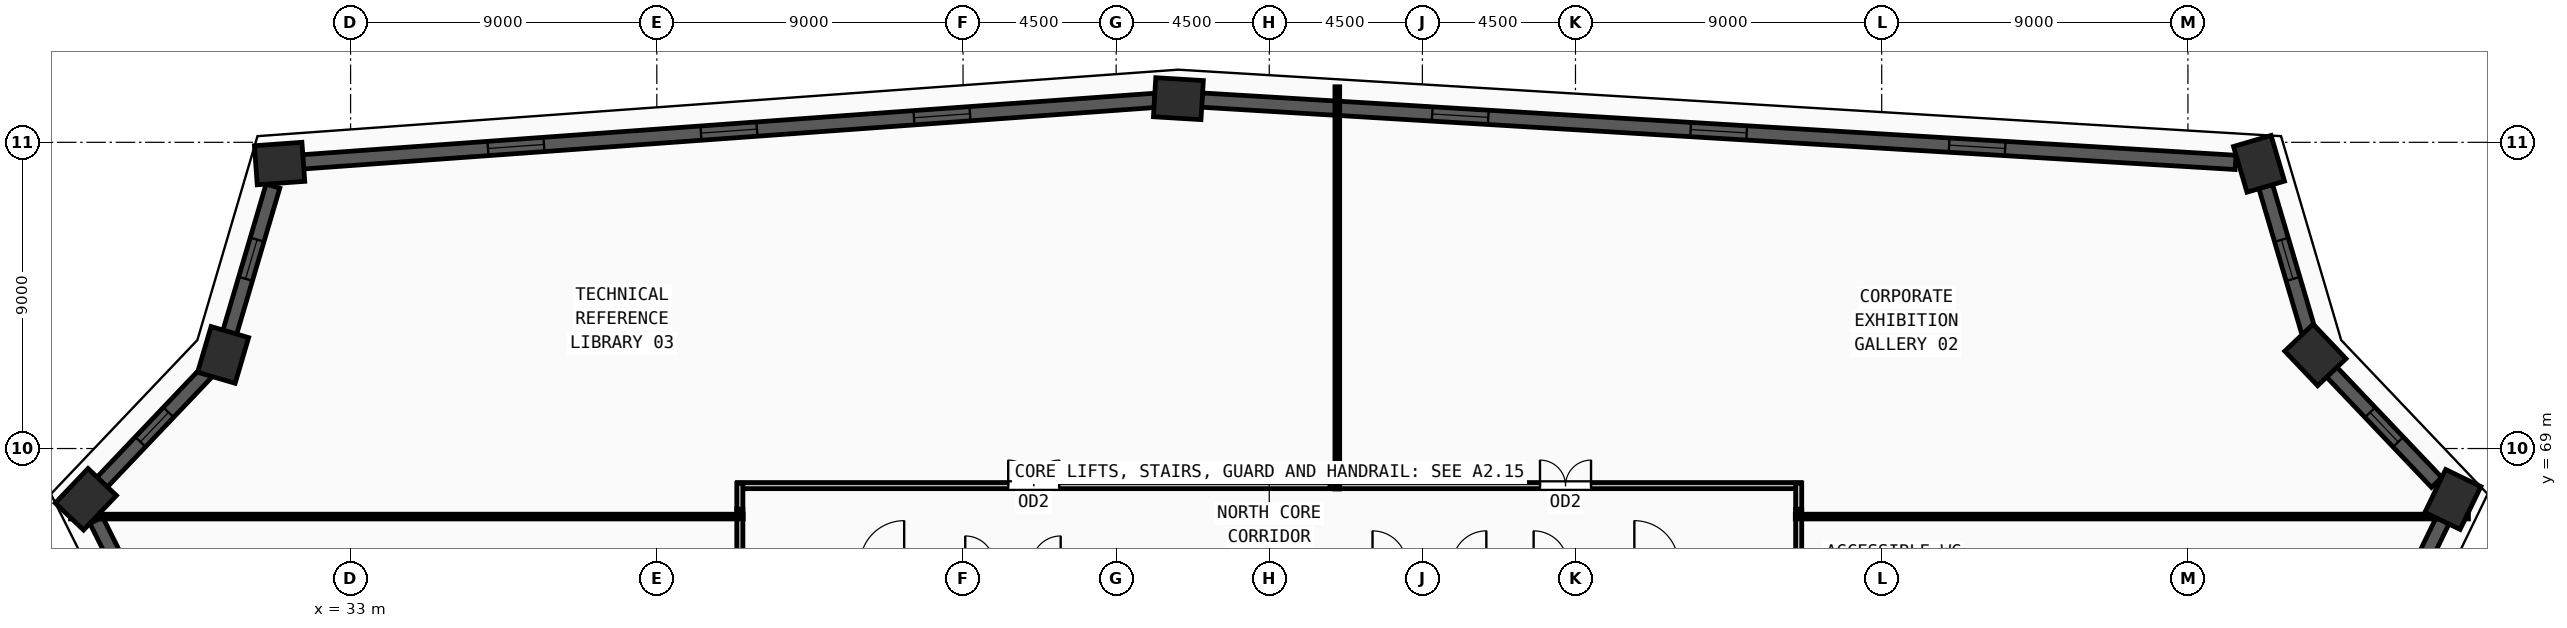
"""IFC4 building model, lengths in metres.
Left out: names, types, materials, properties, quantities, classifications, styles, units other than length and angle.
Written with IfcOpenShell. Run it as: python <this file> out.ifc"""

import sys

from ifc_helpers import new_model, si_unit, direction, frame, frame_2d, origin, origin_2d, place, context, subcontext, project, spatial, rectangle, extrude, source, transform, mapped, element, fill, save


model = new_model("IFC4")
c1 = context("Model", 3, precision=1e-05, world=origin(), true_north=direction((0.0, 1.0)))
c2 = subcontext(c1, "Body", "Model", "MODEL_VIEW")
j1 = project(units=[si_unit("LENGTHUNIT", "METRE"), si_unit("PLANEANGLEUNIT", "RADIAN")], contexts=[c1])
p1 = place(None, origin())
s1 = spatial("IfcSite", under=j1, at=p1, CompositionType="ELEMENT")
p2 = place(p1, origin())
s2 = spatial("IfcBuilding", under=s1, at=p2, CompositionType="ELEMENT")
p3 = place(p2, frame((0.0, 0.0, 166.5)))
s3 = spatial("IfcBuildingStorey", under=s2, at=p3, CompositionType="ELEMENT", Elevation=166.5)
m1 = source(origin(), c2, "Body", "SweptSolid", [
    extrude(rectangle(XDim=1.4, YDim=1.15, at=origin_2d()), origin(), (0.0, 0.0, 1.0), 3.75),
])
for number, where, z_axis, x_axis in (
    (1, (25.218, 67.508, 0.0), (0.0, 0.0, 1.0), (0.689, 0.725, 0.0)),
    (2, (29.254, 71.751, 0.0), (0.0, 0.0, 1.0), (0.283, 0.959, 0.0)),
    (3, (30.913, 77.376, 0.0), (0.0, 0.0, 1.0), (0.997, 0.072, 0.0)),
    (4, (57.329, 79.283, 0.0), (0.0, 0.0, 1.0), (-0.998, 0.06, 0.0)),
    (5, (89.089, 77.368, 0.0), (0.0, 0.0, 1.0), (-0.283, 0.959, 0.0)),
    (6, (90.746, 71.751, 0.0), (0.0, 0.0, 1.0), (-0.689, 0.725, 0.0)),
    (7, (94.787, 67.503, 0.0), (0.0, 0.0, 1.0), (0.436, 0.9, 0.0)),
):
    element("IfcColumn", number, at=place(p3, frame(where, z_axis=z_axis, x_axis=x_axis)), inside=s3, PredefinedType="COLUMN", context=c2, shape_type="MappedRepresentation", body=[
        mapped(m1, transform((0.0, 0.0, 0.0), x_axis=(1.0, 0.0, 0.0), y_axis=(0.0, 1.0, 0.0), z_axis=(0.0, 0.0, 1.0), scale=1.0)),
    ])
p4 = place(p3, frame((83.533, 44.293, 0.0), z_axis=(0.0, 0.0, 1.0), x_axis=(0.43630023006, 0.899801149838, 0.0)))
e8 = element("IfcWall", 8, at=p4, inside=s3, PredefinedType="SOLIDWALL", context=c2, shape_type="SweptSolid", body=[
    extrude(rectangle(XDim=25.104, YDim=0.42, at=frame_2d((12.552, 0.0))), origin(), (0.0, 0.0, 1.0), 3.57),
])
m2 = source(origin(), c2, "Body", "SweptSolid", [
    extrude(rectangle(XDim=1.65, YDim=1.95, at=frame_2d((0.825, 0.975))), frame((0.0, 0.22, 0.0), z_axis=(0.0, -1.0, 0.0), x_axis=(1.0, 0.0, 0.0)), (0.0, 0.0, 1.0), 0.44),
])
p5 = place(p4, frame((5.451, 0.0, 0.55)))
e9 = element("IfcOpeningElement", 9, at=p5, cuts=e8, PredefinedType="OPENING", context=c2, shape_type="MappedRepresentation", body=[
    mapped(m2, transform((0.0, 0.0, 0.0), x_axis=(1.0, 0.0, 0.0), y_axis=(0.0, 1.0, 0.0), z_axis=(0.0, 0.0, 1.0), scale=1.0)),
])
p6 = place(p4, frame((18.003, 0.0, 0.55)))
e10 = element("IfcOpeningElement", 10, at=p6, cuts=e8, PredefinedType="OPENING", context=c2, shape_type="MappedRepresentation", body=[
    mapped(m2, transform((0.0, 0.0, 0.0), x_axis=(1.0, 0.0, 0.0), y_axis=(0.0, 1.0, 0.0), z_axis=(0.0, 0.0, 1.0), scale=1.0)),
])
p7 = place(p3, frame((94.311, 68.003, 0.0), z_axis=(0.0, 0.0, 1.0), x_axis=(-0.689155878993, 0.724613120534, 0.0)))
e11 = element("IfcWall", 11, at=p7, inside=s3, PredefinedType="SOLIDWALL", context=c2, shape_type="SweptSolid", body=[
    extrude(rectangle(XDim=4.482, YDim=0.42, at=frame_2d((2.241, 0.0))), origin(), (0.0, 0.0, 1.0), 3.57),
])
m3 = source(origin(), c2, "Body", "SweptSolid", [
    extrude(rectangle(XDim=1.2, YDim=1.9, at=frame_2d((0.6, 0.95))), frame((0.0, 0.22, 0.0), z_axis=(0.0, -1.0, 0.0), x_axis=(1.0, 0.0, 0.0)), (0.0, 0.0, 1.0), 0.44),
])
p8 = place(p7, frame((1.641, 0.0, 0.55)))
e12 = element("IfcOpeningElement", 12, at=p8, cuts=e11, PredefinedType="OPENING", context=c2, shape_type="MappedRepresentation", body=[
    mapped(m3, transform((0.0, 0.0, 0.0), x_axis=(1.0, 0.0, 0.0), y_axis=(0.0, 1.0, 0.0), z_axis=(0.0, 0.0, 1.0), scale=1.0)),
])
p9 = place(p3, frame((90.551, 72.413, 0.0), z_axis=(0.0, 0.0, 1.0), x_axis=(-0.28308162585, 0.959095820607, 0.0)))
e13 = element("IfcWall", 13, at=p9, inside=s3, PredefinedType="SOLIDWALL", context=c2, shape_type="SweptSolid", body=[
    extrude(rectangle(XDim=4.476, YDim=0.42, at=frame_2d((2.238, 0.0))), origin(), (0.0, 0.0, 1.0), 3.57),
])
p10 = place(p9, frame((1.638, 0.0, 0.55)))
e14 = element("IfcOpeningElement", 14, at=p10, cuts=e13, PredefinedType="OPENING", context=c2, shape_type="MappedRepresentation", body=[
    mapped(m3, transform((0.0, 0.0, 0.0), x_axis=(1.0, 0.0, 0.0), y_axis=(0.0, 1.0, 0.0), z_axis=(0.0, 0.0, 1.0), scale=1.0)),
])
p11 = place(p3, frame((88.4, 77.41, 0.0), z_axis=(0.0, 0.0, 1.0), x_axis=(-0.998188812237, 0.060158915591, 0.0)))
e15 = element("IfcWall", 15, at=p11, inside=s3, PredefinedType="SOLIDWALL", context=c2, shape_type="SweptSolid", body=[
    extrude(rectangle(XDim=30.437, YDim=0.42, at=frame_2d((15.219, 0.0))), origin(), (0.0, 0.0, 1.0), 3.57),
])
p12 = place(p11, frame((6.784, 0.0, 0.55)))
e16 = element("IfcOpeningElement", 16, at=p12, cuts=e15, PredefinedType="OPENING", context=c2, shape_type="MappedRepresentation", body=[
    mapped(m2, transform((0.0, 0.0, 0.0), x_axis=(1.0, 0.0, 0.0), y_axis=(0.0, 1.0, 0.0), z_axis=(0.0, 0.0, 1.0), scale=1.0)),
])
p13 = place(p11, frame((14.394, 0.0, 0.55)))
e17 = element("IfcOpeningElement", 17, at=p13, cuts=e15, PredefinedType="OPENING", context=c2, shape_type="MappedRepresentation", body=[
    mapped(m2, transform((0.0, 0.0, 0.0), x_axis=(1.0, 0.0, 0.0), y_axis=(0.0, 1.0, 0.0), z_axis=(0.0, 0.0, 1.0), scale=1.0)),
])
p14 = place(p11, frame((22.003, 0.0, 0.55)))
e18 = element("IfcOpeningElement", 18, at=p14, cuts=e15, PredefinedType="OPENING", context=c2, shape_type="MappedRepresentation", body=[
    mapped(m2, transform((0.0, 0.0, 0.0), x_axis=(1.0, 0.0, 0.0), y_axis=(0.0, 1.0, 0.0), z_axis=(0.0, 0.0, 1.0), scale=1.0)),
])
p15 = place(p3, frame((56.641, 79.233, 0.0), z_axis=(0.0, 0.0, 1.0), x_axis=(-0.997406603589, -0.071972683136, 0.0)))
e19 = element("IfcWall", 19, at=p15, inside=s3, PredefinedType="SOLIDWALL", context=c2, shape_type="SweptSolid", body=[
    extrude(rectangle(XDim=25.105, YDim=0.42, at=frame_2d((12.553, 0.0))), origin(), (0.0, 0.0, 1.0), 3.57),
])
p16 = place(p15, frame((5.451, 0.0, 0.55)))
e20 = element("IfcOpeningElement", 20, at=p16, cuts=e19, PredefinedType="OPENING", context=c2, shape_type="MappedRepresentation", body=[
    mapped(m2, transform((0.0, 0.0, 0.0), x_axis=(1.0, 0.0, 0.0), y_axis=(0.0, 1.0, 0.0), z_axis=(0.0, 0.0, 1.0), scale=1.0)),
])
p17 = place(p15, frame((11.728, 0.0, 0.55)))
e21 = element("IfcOpeningElement", 21, at=p17, cuts=e19, PredefinedType="OPENING", context=c2, shape_type="MappedRepresentation", body=[
    mapped(m2, transform((0.0, 0.0, 0.0), x_axis=(1.0, 0.0, 0.0), y_axis=(0.0, 1.0, 0.0), z_axis=(0.0, 0.0, 1.0), scale=1.0)),
])
p18 = place(p15, frame((18.004, 0.0, 0.55)))
e22 = element("IfcOpeningElement", 22, at=p18, cuts=e19, PredefinedType="OPENING", context=c2, shape_type="MappedRepresentation", body=[
    mapped(m2, transform((0.0, 0.0, 0.0), x_axis=(1.0, 0.0, 0.0), y_axis=(0.0, 1.0, 0.0), z_axis=(0.0, 0.0, 1.0), scale=1.0)),
])
p19 = place(p3, frame((30.718, 76.714, 0.0), z_axis=(0.0, 0.0, 1.0), x_axis=(-0.282994479967, -0.959121537819, 0.0)))
e23 = element("IfcWall", 23, at=p19, inside=s3, PredefinedType="SOLIDWALL", context=c2, shape_type="SweptSolid", body=[
    extrude(rectangle(XDim=4.484, YDim=0.42, at=frame_2d((2.242, 0.0))), origin(), (0.0, 0.0, 1.0), 3.57),
])
p20 = place(p19, frame((1.642, 0.0, 0.55)))
e24 = element("IfcOpeningElement", 24, at=p20, cuts=e23, PredefinedType="OPENING", context=c2, shape_type="MappedRepresentation", body=[
    mapped(m3, transform((0.0, 0.0, 0.0), x_axis=(1.0, 0.0, 0.0), y_axis=(0.0, 1.0, 0.0), z_axis=(0.0, 0.0, 1.0), scale=1.0)),
])
p21 = place(p3, frame((28.778, 71.251, 0.0), z_axis=(0.0, 0.0, 1.0), x_axis=(-0.689126443885, -0.724641114165, 0.0)))
e25 = element("IfcWall", 25, at=p21, inside=s3, PredefinedType="SOLIDWALL", context=c2, shape_type="SweptSolid", body=[
    extrude(rectangle(XDim=4.475, YDim=0.42, at=frame_2d((2.238, 0.0))), origin(), (0.0, 0.0, 1.0), 3.57),
])
p22 = place(p21, frame((1.638, 0.0, 0.55)))
e26 = element("IfcOpeningElement", 26, at=p22, cuts=e25, PredefinedType="OPENING", context=c2, shape_type="MappedRepresentation", body=[
    mapped(m3, transform((0.0, 0.0, 0.0), x_axis=(1.0, 0.0, 0.0), y_axis=(0.0, 1.0, 0.0), z_axis=(0.0, 0.0, 1.0), scale=1.0)),
])
p23 = place(p3, frame((25.526, 66.891, 0.0), z_axis=(0.0, 0.0, 1.0), x_axis=(0.446995422188, -0.894536244399, 0.0)))
e27 = element("IfcWall", 27, at=p23, inside=s3, PredefinedType="SOLIDWALL", context=c2, shape_type="SweptSolid", body=[
    extrude(rectangle(XDim=30.439, YDim=0.42, at=frame_2d((15.22, 0.0))), origin(), (0.0, 0.0, 1.0), 3.57),
])
p24 = place(p23, frame((5.235, 0.0, 0.55)))
e28 = element("IfcOpeningElement", 28, at=p24, cuts=e27, PredefinedType="OPENING", context=c2, shape_type="MappedRepresentation", body=[
    mapped(m2, transform((0.0, 0.0, 0.0), x_axis=(1.0, 0.0, 0.0), y_axis=(0.0, 1.0, 0.0), z_axis=(0.0, 0.0, 1.0), scale=1.0)),
])
p25 = place(p23, frame((15.945, 0.0, 0.55)))
e29 = element("IfcOpeningElement", 29, at=p25, cuts=e27, PredefinedType="OPENING", context=c2, shape_type="MappedRepresentation", body=[
    mapped(m2, transform((0.0, 0.0, 0.0), x_axis=(1.0, 0.0, 0.0), y_axis=(0.0, 1.0, 0.0), z_axis=(0.0, 0.0, 1.0), scale=1.0)),
])
p26 = place(p3, frame((61.785, 67.91, 0.0), z_axis=(0.0, 0.0, 1.0), x_axis=(1.0, 0.0, 0.0)))
e30 = element("IfcWall", 30, at=p26, inside=s3, PredefinedType="PARTITIONING", context=c2, shape_type="SweptSolid", body=[
    extrude(rectangle(XDim=13.845, YDim=0.18, at=frame_2d((6.922, 0.0))), origin(), (0.0, 0.0, 1.0), 3.57),
])
m4 = source(origin(), c2, "Body", "SweptSolid", [
    extrude(rectangle(XDim=1.5, YDim=2.2, at=frame_2d((0.75, 1.1))), frame((0.0, 0.1, 0.0), z_axis=(0.0, -1.0, 0.0), x_axis=(1.0, 0.0, 0.0)), (0.0, 0.0, 1.0), 0.2),
])
p27 = place(p26, frame((6.172, 0.0, 0.0)))
e31 = element("IfcOpeningElement", 31, at=p27, cuts=e30, PredefinedType="OPENING", context=c2, shape_type="MappedRepresentation", body=[
    mapped(m4, transform((0.0, 0.0, 0.0), x_axis=(1.0, 0.0, 0.0), y_axis=(0.0, 1.0, 0.0), z_axis=(0.0, 0.0, 1.0), scale=1.0)),
])
p28 = place(p3, frame((44.37, 67.91, 0.0), z_axis=(0.0, 0.0, 1.0), x_axis=(1.0, 0.0, 0.0)))
e32 = element("IfcWall", 32, at=p28, inside=s3, PredefinedType="PARTITIONING", context=c2, shape_type="SweptSolid", body=[
    extrude(rectangle(XDim=17.415, YDim=0.18, at=frame_2d((8.708, 0.0))), origin(), (0.0, 0.0, 1.0), 3.57),
])
p29 = place(p28, frame((7.957, 0.0, 0.0)))
e33 = element("IfcOpeningElement", 33, at=p29, cuts=e32, PredefinedType="OPENING", context=c2, shape_type="MappedRepresentation", body=[
    mapped(m4, transform((0.0, 0.0, 0.0), x_axis=(1.0, 0.0, 0.0), y_axis=(0.0, 1.0, 0.0), z_axis=(0.0, 0.0, 1.0), scale=1.0)),
])
p30 = place(p3, frame((44.44, 59.285, 0.0), z_axis=(0.0, 0.0, 1.0), x_axis=(0.0, 1.0, 0.0)))
e34 = element("IfcWall", 34, at=p30, inside=s3, PredefinedType="PARTITIONING", context=c2, shape_type="SweptSolid", body=[
    extrude(rectangle(XDim=7.93, YDim=0.18, at=frame_2d((3.965, 0.0))), origin(), (0.0, 0.0, 1.0), 3.57),
])
p31 = place(p30, frame((3.215, 0.0, 0.0)))
e35 = element("IfcOpeningElement", 35, at=p31, cuts=e34, PredefinedType="OPENING", context=c2, shape_type="MappedRepresentation", body=[
    mapped(m4, transform((0.0, 0.0, 0.0), x_axis=(1.0, 0.0, 0.0), y_axis=(0.0, 1.0, 0.0), z_axis=(0.0, 0.0, 1.0), scale=1.0)),
])
p32 = place(p3, frame((75.56, 67.215, 0.0), z_axis=(0.0, 0.0, 1.0), x_axis=(0.0, -1.0, 0.0)))
e36 = element("IfcWall", 36, at=p32, inside=s3, PredefinedType="PARTITIONING", context=c2, shape_type="SweptSolid", body=[
    extrude(rectangle(XDim=2.035, YDim=0.18, at=frame_2d((1.018, 0.0))), origin(), (0.0, 0.0, 1.0), 3.57),
])
for number, where, z_axis, x_axis in (
    (37, (75.56, 67.98, 0.0), (0.0, 0.0, 1.0), (0.0, -1.0, 0.0)),
    (38, (44.44, 67.215, 0.0), (0.0, 0.0, 1.0), (0.0, 1.0, 0.0)),
):
    element("IfcWall", number, at=place(p3, frame(where, z_axis=z_axis, x_axis=x_axis)), inside=s3, PredefinedType="PARTITIONING", context=c2, shape_type="SweptSolid", body=[
        extrude(rectangle(XDim=0.765, YDim=0.18, at=frame_2d((0.382, 0.0))), origin(), (0.0, 0.0, 1.0), 3.57),
    ])
p33 = place(p3, frame((44.54, 67.0, 0.0), z_axis=(0.0, 0.0, 1.0), x_axis=(-1.0, 0.0, 0.0)))
e39 = element("IfcWall", 39, at=p33, inside=s3, PredefinedType="PARTITIONING", context=c2, shape_type="SweptSolid", body=[
    extrude(rectangle(XDim=19.772, YDim=0.14, at=frame_2d((9.886, 0.0))), origin(), (0.0, 0.0, 1.0), 2.755),
])
p34 = place(p3, frame((75.46, 67.0, 0.0), z_axis=(0.0, 0.0, 1.0), x_axis=(1.0, 0.0, 0.0)))
e40 = element("IfcWall", 40, at=p34, inside=s3, PredefinedType="PARTITIONING", context=c2, shape_type="SweptSolid", body=[
    extrude(rectangle(XDim=19.784, YDim=0.14, at=frame_2d((9.892, 0.0))), origin(), (0.0, 0.0, 1.0), 2.755),
])
p35 = place(p3, frame((62.0, 67.81, 0.0), z_axis=(0.0, 0.0, 1.0), x_axis=(0.0, 1.0, 0.0)))
e41 = element("IfcWall", 41, at=p35, inside=s3, PredefinedType="PARTITIONING", context=c2, shape_type="SweptSolid", body=[
    extrude(rectangle(XDim=11.823, YDim=0.14, at=frame_2d((5.912, 0.0))), origin(), (0.0, 0.0, 1.0), 3.57),
])
m5 = source(origin(), c2, "Body", "SweptSolid", [
    extrude(rectangle(XDim=1.2, YDim=1.9, at=frame_2d((0.6, 0.95))), frame((0.0, 0.03, 0.0), z_axis=(0.0, -1.0, 0.0), x_axis=(1.0, 0.0, 0.0)), (0.0, 0.0, 1.0), 0.06),
])
p36 = place(p8, origin())
e42 = element("IfcWindow", 42, at=p36, inside=s3, PartitioningType="SINGLE_PANEL", PredefinedType="WINDOW", context=c2, shape_type="MappedRepresentation", body=[
    mapped(m5, transform((0.0, 0.0, 0.0), x_axis=(1.0, 0.0, 0.0), y_axis=(0.0, 1.0, 0.0), z_axis=(0.0, 0.0, 1.0), scale=1.0)),
])
fill(e12, e42)
p37 = place(p10, origin())
e43 = element("IfcWindow", 43, at=p37, inside=s3, PartitioningType="SINGLE_PANEL", PredefinedType="WINDOW", context=c2, shape_type="MappedRepresentation", body=[
    mapped(m5, transform((0.0, 0.0, 0.0), x_axis=(1.0, 0.0, 0.0), y_axis=(0.0, 1.0, 0.0), z_axis=(0.0, 0.0, 1.0), scale=1.0)),
])
fill(e14, e43)
m6 = source(origin(), c2, "Body", "SweptSolid", [
    extrude(rectangle(XDim=1.65, YDim=1.95, at=frame_2d((0.825, 0.975))), frame((0.0, 0.03, 0.0), z_axis=(0.0, -1.0, 0.0), x_axis=(1.0, 0.0, 0.0)), (0.0, 0.0, 1.0), 0.06),
])
p38 = place(p12, origin())
e44 = element("IfcWindow", 44, at=p38, inside=s3, PartitioningType="DOUBLE_PANEL_VERTICAL", PredefinedType="WINDOW", context=c2, shape_type="MappedRepresentation", body=[
    mapped(m6, transform((0.0, 0.0, 0.0), x_axis=(1.0, 0.0, 0.0), y_axis=(0.0, 1.0, 0.0), z_axis=(0.0, 0.0, 1.0), scale=1.0)),
])
fill(e16, e44)
p39 = place(p13, origin())
e45 = element("IfcWindow", 45, at=p39, inside=s3, PartitioningType="DOUBLE_PANEL_VERTICAL", PredefinedType="WINDOW", context=c2, shape_type="MappedRepresentation", body=[
    mapped(m6, transform((0.0, 0.0, 0.0), x_axis=(1.0, 0.0, 0.0), y_axis=(0.0, 1.0, 0.0), z_axis=(0.0, 0.0, 1.0), scale=1.0)),
])
fill(e17, e45)
p40 = place(p14, origin())
e46 = element("IfcWindow", 46, at=p40, inside=s3, PartitioningType="DOUBLE_PANEL_VERTICAL", PredefinedType="WINDOW", context=c2, shape_type="MappedRepresentation", body=[
    mapped(m6, transform((0.0, 0.0, 0.0), x_axis=(1.0, 0.0, 0.0), y_axis=(0.0, 1.0, 0.0), z_axis=(0.0, 0.0, 1.0), scale=1.0)),
])
fill(e18, e46)
p41 = place(p16, origin())
e47 = element("IfcWindow", 47, at=p41, inside=s3, PartitioningType="DOUBLE_PANEL_VERTICAL", PredefinedType="WINDOW", context=c2, shape_type="MappedRepresentation", body=[
    mapped(m6, transform((0.0, 0.0, 0.0), x_axis=(1.0, 0.0, 0.0), y_axis=(0.0, 1.0, 0.0), z_axis=(0.0, 0.0, 1.0), scale=1.0)),
])
fill(e20, e47)
p42 = place(p17, origin())
e48 = element("IfcWindow", 48, at=p42, inside=s3, PartitioningType="DOUBLE_PANEL_VERTICAL", PredefinedType="WINDOW", context=c2, shape_type="MappedRepresentation", body=[
    mapped(m6, transform((0.0, 0.0, 0.0), x_axis=(1.0, 0.0, 0.0), y_axis=(0.0, 1.0, 0.0), z_axis=(0.0, 0.0, 1.0), scale=1.0)),
])
fill(e21, e48)
p43 = place(p18, origin())
e49 = element("IfcWindow", 49, at=p43, inside=s3, PartitioningType="DOUBLE_PANEL_VERTICAL", PredefinedType="WINDOW", context=c2, shape_type="MappedRepresentation", body=[
    mapped(m6, transform((0.0, 0.0, 0.0), x_axis=(1.0, 0.0, 0.0), y_axis=(0.0, 1.0, 0.0), z_axis=(0.0, 0.0, 1.0), scale=1.0)),
])
fill(e22, e49)
p44 = place(p20, origin())
e50 = element("IfcWindow", 50, at=p44, inside=s3, PartitioningType="SINGLE_PANEL", PredefinedType="WINDOW", context=c2, shape_type="MappedRepresentation", body=[
    mapped(m5, transform((0.0, 0.0, 0.0), x_axis=(1.0, 0.0, 0.0), y_axis=(0.0, 1.0, 0.0), z_axis=(0.0, 0.0, 1.0), scale=1.0)),
])
fill(e24, e50)
p45 = place(p22, origin())
e51 = element("IfcWindow", 51, at=p45, inside=s3, PartitioningType="SINGLE_PANEL", PredefinedType="WINDOW", context=c2, shape_type="MappedRepresentation", body=[
    mapped(m5, transform((0.0, 0.0, 0.0), x_axis=(1.0, 0.0, 0.0), y_axis=(0.0, 1.0, 0.0), z_axis=(0.0, 0.0, 1.0), scale=1.0)),
])
fill(e26, e51)
m7 = source(origin(), c2, "Body", "SweptSolid", [
    extrude(rectangle(XDim=1.5, YDim=2.2, at=frame_2d((0.75, 1.1))), frame((0.0, 0.025, 0.0), z_axis=(0.0, -1.0, 0.0), x_axis=(1.0, 0.0, 0.0)), (0.0, 0.0, 1.0), 0.05),
])
p46 = place(p27, origin())
e52 = element("IfcDoor", 52, at=p46, inside=s3, OperationType="DOUBLE_DOOR_SINGLE_SWING", PredefinedType="DOOR", context=c2, shape_type="MappedRepresentation", body=[
    mapped(m7, transform((0.0, 0.0, 0.0), x_axis=(1.0, 0.0, 0.0), y_axis=(0.0, 1.0, 0.0), z_axis=(0.0, 0.0, 1.0), scale=1.0)),
])
fill(e31, e52)
p47 = place(p29, origin())
e53 = element("IfcDoor", 53, at=p47, inside=s3, OperationType="DOUBLE_DOOR_SINGLE_SWING", PredefinedType="DOOR", context=c2, shape_type="MappedRepresentation", body=[
    mapped(m7, transform((0.0, 0.0, 0.0), x_axis=(1.0, 0.0, 0.0), y_axis=(0.0, 1.0, 0.0), z_axis=(0.0, 0.0, 1.0), scale=1.0)),
])
fill(e33, e53)
save(model, sys.argv[1])
